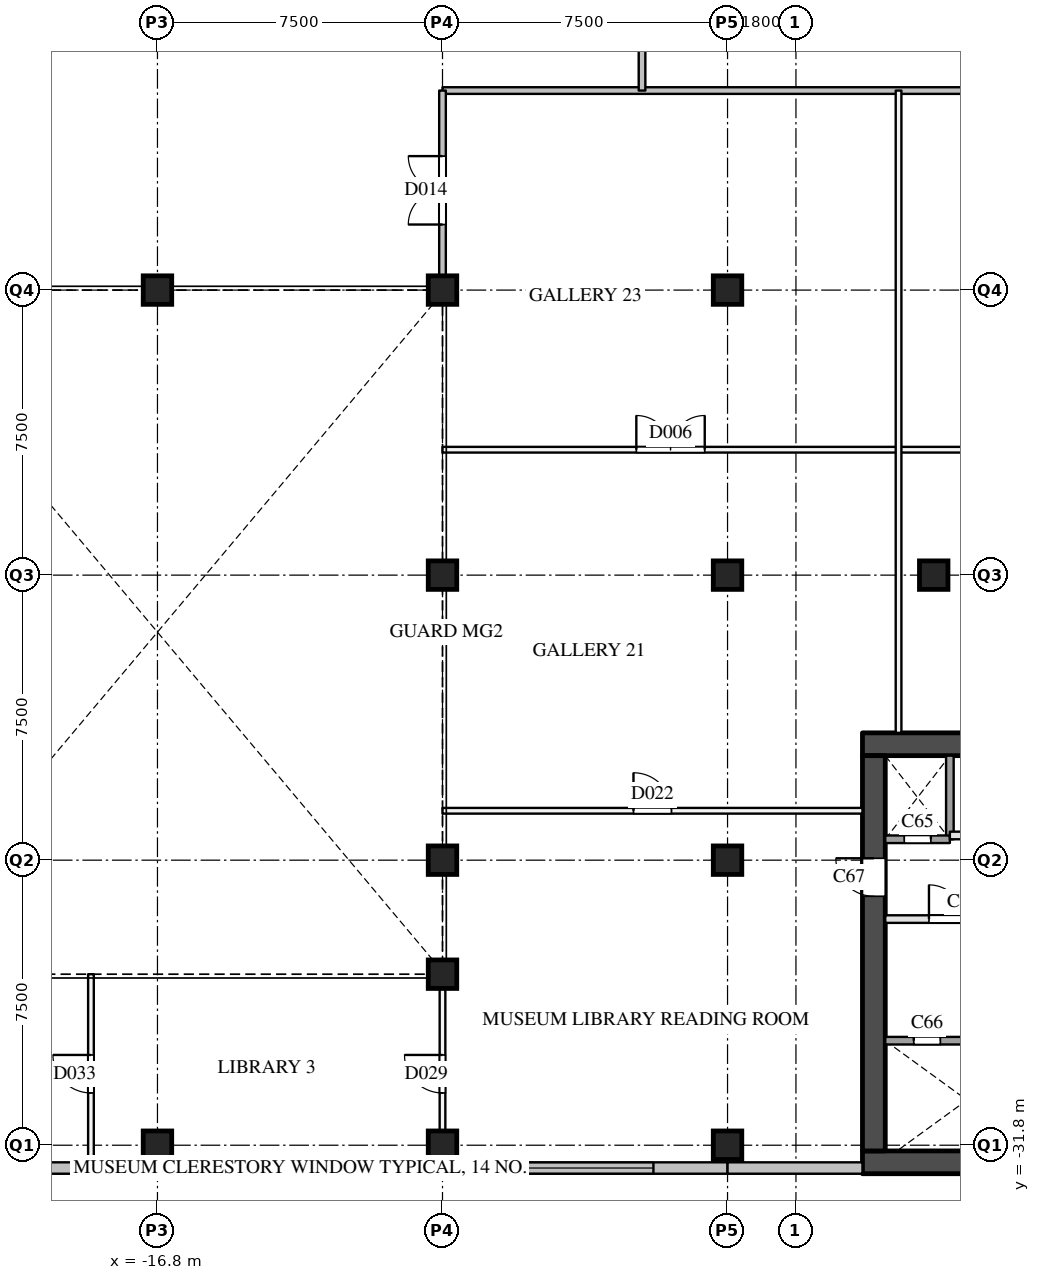
"""IFC4 building model, lengths in metres.
Left out: names, types, materials, properties, quantities, classifications, styles, units other than length and angle.
Written with IfcOpenShell. Run it as: python <this file> out.ifc"""

import sys

from ifc_helpers import new_model, si_unit, direction, frame, frame_2d, origin, origin_2d, place, context, subcontext, project, spatial, rectangle, extrude, element, fill, save


model = new_model("IFC4")
c1 = context("Model", 3, precision=1e-05, world=origin(), true_north=direction((0.0, 1.0)))
c2 = subcontext(c1, "Body", "Model", "MODEL_VIEW")
j1 = project(units=[si_unit("LENGTHUNIT", "METRE"), si_unit("PLANEANGLEUNIT", "RADIAN")], contexts=[c1])
p1 = place(None, origin())
s1 = spatial("IfcSite", under=j1, at=p1, CompositionType="ELEMENT")
p2 = place(p1, origin())
s2 = spatial("IfcBuilding", under=s1, at=p2, CompositionType="ELEMENT")
p3 = place(p2, frame((0.0, 0.0, 21.0)))
s3 = spatial("IfcBuildingStorey", under=s2, at=p3, CompositionType="ELEMENT", Elevation=21.0)
for number, where, z_axis, x_axis in (
    (1, (-16.8, -31.8, 0.0), (0.0, 0.0, 1.0), (1.0, 0.0, 0.0)),
    (2, (-16.8, -9.3, 0.0), (0.0, 0.0, 1.0), (1.0, 0.0, 0.0)),
    (3, (-9.3, -31.8, 0.0), (0.0, 0.0, 1.0), (1.0, 0.0, 0.0)),
    (4, (-9.3, -24.3, 0.0), (0.0, 0.0, 1.0), (1.0, 0.0, 0.0)),
    (5, (-9.3, -16.8, 0.0), (0.0, 0.0, 1.0), (1.0, 0.0, 0.0)),
    (6, (-9.3, -9.3, 0.0), (0.0, 0.0, 1.0), (1.0, 0.0, 0.0)),
    (7, (-1.8, -31.8, 0.0), (0.0, 0.0, 1.0), (1.0, 0.0, 0.0)),
    (8, (-1.8, -24.3, 0.0), (0.0, 0.0, 1.0), (1.0, 0.0, 0.0)),
    (9, (-1.8, -16.8, 0.0), (0.0, 0.0, 1.0), (1.0, 0.0, 0.0)),
    (10, (-1.8, -9.3, 0.0), (0.0, 0.0, 1.0), (1.0, 0.0, 0.0)),
    (11, (-9.3, -27.3, 0.0), (0.0, 0.0, 1.0), (1.0, 0.0, 0.0)),
    (12, (3.625, -16.8, 0.0), (0.0, 0.0, 1.0), (1.0, 0.0, 0.0)),
):
    element("IfcColumn", number, at=place(p3, frame(where, z_axis=z_axis, x_axis=x_axis)), inside=s3, PredefinedType="COLUMN", context=c2, shape_type="SweptSolid", body=[
        extrude(rectangle(XDim=0.75, YDim=0.75, at=origin_2d()), origin(), (0.0, 0.0, 1.0), 5.0),
    ])
p4 = place(p3, frame((-20.35, -32.4, 0.0), z_axis=(0.0, 0.0, 1.0), x_axis=(1.0, 0.0, 0.0)))
e13 = element("IfcWall", 13, at=p4, inside=s3, PredefinedType="SOLIDWALL", context=c2, shape_type="SweptSolid", body=[
    extrude(rectangle(XDim=3.55, YDim=0.3, at=frame_2d((1.775, 0.0))), origin(), (0.0, 0.0, 1.0), 4.59),
])
p5 = place(p3, frame((-16.8, -32.4, 0.0), z_axis=(0.0, 0.0, 1.0), x_axis=(1.0, 0.0, 0.0)))
e14 = element("IfcWall", 14, at=p5, inside=s3, PredefinedType="SOLIDWALL", context=c2, shape_type="SweptSolid", body=[
    extrude(rectangle(XDim=7.5, YDim=0.3, at=frame_2d((3.75, 0.0))), origin(), (0.0, 0.0, 1.0), 4.59),
])
p6 = place(p5, frame((1.95, 0.0, 2.4)))
e15 = element("IfcOpeningElement", 15, at=p6, cuts=e14, PredefinedType="OPENING", context=c2, shape_type="SweptSolid", body=[
    extrude(rectangle(XDim=3.6, YDim=1.2, at=frame_2d((1.8, 0.6))), frame((0.0, 0.16, 0.0), z_axis=(0.0, -1.0, 0.0), x_axis=(1.0, 0.0, 0.0)), (0.0, 0.0, 1.0), 0.32),
])
p7 = place(p3, frame((-9.3, -32.4, 0.0), z_axis=(0.0, 0.0, 1.0), x_axis=(1.0, 0.0, 0.0)))
e16 = element("IfcWall", 16, at=p7, inside=s3, PredefinedType="SOLIDWALL", context=c2, shape_type="SweptSolid", body=[
    extrude(rectangle(XDim=7.5, YDim=0.3, at=frame_2d((3.75, 0.0))), origin(), (0.0, 0.0, 1.0), 4.59),
])
p8 = place(p7, frame((1.95, 0.0, 2.4)))
e17 = element("IfcOpeningElement", 17, at=p8, cuts=e16, PredefinedType="OPENING", context=c2, shape_type="SweptSolid", body=[
    extrude(rectangle(XDim=3.6, YDim=1.2, at=frame_2d((1.8, 0.6))), frame((0.0, 0.16, 0.0), z_axis=(0.0, -1.0, 0.0), x_axis=(1.0, 0.0, 0.0)), (0.0, 0.0, 1.0), 0.32),
])
p9 = place(p3, frame((-1.8, -32.4, 0.0), z_axis=(0.0, 0.0, 1.0), x_axis=(1.0, 0.0, 0.0)))
e18 = element("IfcWall", 18, at=p9, inside=s3, PredefinedType="SOLIDWALL", context=c2, shape_type="SweptSolid", body=[
    extrude(rectangle(XDim=3.55, YDim=0.3, at=frame_2d((1.775, 0.0))), origin(), (0.0, 0.0, 1.0), 4.59),
])
for number, where, z_axis, x_axis in (
    (19, (1.75, -32.25, 0.0), (0.0, 0.0, 1.0), (1.0, 0.0, 0.0)),
    (20, (1.75, -21.25, 0.0), (0.0, 0.0, 1.0), (1.0, 0.0, 0.0)),
):
    element("IfcWall", number, at=place(p3, frame(where, z_axis=z_axis, x_axis=x_axis)), inside=s3, PredefinedType="SHEAR", context=c2, shape_type="SweptSolid", body=[
        extrude(rectangle(XDim=12.2, YDim=0.6, at=frame_2d((6.1, 0.0))), origin(), (0.0, 0.0, 1.0), 4.55),
    ])
p10 = place(p3, frame((2.05, -31.95, 0.0), z_axis=(0.0, 0.0, 1.0), x_axis=(0.0, 1.0, 0.0)))
e21 = element("IfcWall", 21, at=p10, inside=s3, PredefinedType="SHEAR", context=c2, shape_type="SweptSolid", body=[
    extrude(rectangle(XDim=10.4, YDim=0.6, at=frame_2d((5.2, 0.0))), origin(), (0.0, 0.0, 1.0), 4.55),
])
p11 = place(p10, frame((6.7, 0.0, 0.0)))
e22 = element("IfcOpeningElement", 22, at=p11, cuts=e21, PredefinedType="OPENING", context=c2, shape_type="SweptSolid", body=[
    extrude(rectangle(XDim=1.0, YDim=2.1, at=frame_2d((0.5, 1.05))), frame((0.0, 0.31, 0.0), z_axis=(0.0, -1.0, 0.0), x_axis=(1.0, 0.0, 0.0)), (0.0, 0.0, 1.0), 0.62),
])
p12 = place(p3, frame((4.05, -23.75, 0.0), z_axis=(0.0, 0.0, 1.0), x_axis=(0.0, 1.0, 0.0)))
e23 = element("IfcWall", 23, at=p12, inside=s3, PredefinedType="SOLIDWALL", context=c2, shape_type="SweptSolid", body=[
    extrude(rectangle(XDim=2.2, YDim=0.2, at=frame_2d((1.1, 0.0))), origin(), (0.0, 0.0, 1.0), 4.55),
])
p13 = place(p3, frame((2.35, -29.05, 0.0), z_axis=(0.0, 0.0, 1.0), x_axis=(1.0, 0.0, 0.0)))
e24 = element("IfcWall", 24, at=p13, inside=s3, PredefinedType="SOLIDWALL", context=c2, shape_type="SweptSolid", body=[
    extrude(rectangle(XDim=4.3, YDim=0.2, at=frame_2d((2.15, 0.0))), origin(), (0.0, 0.0, 1.0), 4.55),
])
p14 = place(p13, frame((2.65, 0.0, 0.0)))
e25 = element("IfcOpeningElement", 25, at=p14, cuts=e24, PredefinedType="OPENING", context=c2, shape_type="SweptSolid", body=[
    extrude(rectangle(XDim=1.2, YDim=2.1, at=frame_2d((0.6, 1.05))), frame((0.0, 0.11, 0.0), z_axis=(0.0, -1.0, 0.0), x_axis=(1.0, 0.0, 0.0)), (0.0, 0.0, 1.0), 0.22),
])
p15 = place(p13, frame((0.75, 0.0, 0.0)))
e26 = element("IfcOpeningElement", 26, at=p15, cuts=e24, PredefinedType="OPENING", context=c2, shape_type="SweptSolid", body=[
    extrude(rectangle(XDim=0.7, YDim=2.1, at=frame_2d((0.35, 1.05))), frame((0.0, 0.11, 0.0), z_axis=(0.0, -1.0, 0.0), x_axis=(1.0, 0.0, 0.0)), (0.0, 0.0, 1.0), 0.22),
])
p16 = place(p3, frame((2.35, -25.85, 0.0), z_axis=(0.0, 0.0, 1.0), x_axis=(1.0, 0.0, 0.0)))
e27 = element("IfcWall", 27, at=p16, inside=s3, PredefinedType="PARTITIONING", context=c2, shape_type="SweptSolid", body=[
    extrude(rectangle(XDim=4.3, YDim=0.2, at=frame_2d((2.15, 0.0))), origin(), (0.0, 0.0, 1.0), 4.55),
])
p17 = place(p16, frame((1.15, 0.0, 0.0)))
e28 = element("IfcOpeningElement", 28, at=p17, cuts=e27, PredefinedType="OPENING", context=c2, shape_type="SweptSolid", body=[
    extrude(rectangle(XDim=1.8, YDim=2.1, at=frame_2d((0.9, 1.05))), frame((0.0, 0.11, 0.0), z_axis=(0.0, -1.0, 0.0), x_axis=(1.0, 0.0, 0.0)), (0.0, 0.0, 1.0), 0.22),
])
p18 = place(p3, frame((4.05, -23.65, 0.0), z_axis=(0.0, 0.0, 1.0), x_axis=(1.0, 0.0, 0.0)))
e29 = element("IfcWall", 29, at=p18, inside=s3, PredefinedType="PARTITIONING", context=c2, shape_type="SweptSolid", body=[
    extrude(rectangle(XDim=9.3, YDim=0.2, at=frame_2d((4.65, 0.0))), origin(), (0.0, 0.0, 1.0), 4.55),
])
p19 = place(p18, frame((4.2, 0.0, 0.0)))
e30 = element("IfcOpeningElement", 30, at=p19, cuts=e29, PredefinedType="OPENING", context=c2, shape_type="SweptSolid", body=[
    extrude(rectangle(XDim=0.9, YDim=2.1, at=frame_2d((0.45, 1.05))), frame((0.0, 0.11, 0.0), z_axis=(0.0, -1.0, 0.0), x_axis=(1.0, 0.0, 0.0)), (0.0, 0.0, 1.0), 0.22),
])
p20 = place(p3, frame((2.35, -23.75, 0.0), z_axis=(0.0, 0.0, 1.0), x_axis=(1.0, 0.0, 0.0)))
e31 = element("IfcWall", 31, at=p20, inside=s3, PredefinedType="SOLIDWALL", context=c2, shape_type="SweptSolid", body=[
    extrude(rectangle(XDim=1.7, YDim=0.2, at=frame_2d((0.85, 0.0))), origin(), (0.0, 0.0, 1.0), 4.55),
])
p21 = place(p20, frame((0.5, 0.0, 0.0)))
e32 = element("IfcOpeningElement", 32, at=p21, cuts=e31, PredefinedType="OPENING", context=c2, shape_type="SweptSolid", body=[
    extrude(rectangle(XDim=0.7, YDim=2.1, at=frame_2d((0.35, 1.05))), frame((0.0, 0.11, 0.0), z_axis=(0.0, -1.0, 0.0), x_axis=(1.0, 0.0, 0.0)), (0.0, 0.0, 1.0), 0.22),
])
p22 = place(p3, frame((-9.3, -4.05, 0.0), z_axis=(0.0, 0.0, 1.0), x_axis=(1.0, 0.0, 0.0)))
e33 = element("IfcWall", 33, at=p22, inside=s3, PredefinedType="PARTITIONING", context=c2, shape_type="SweptSolid", body=[
    extrude(rectangle(XDim=23.25, YDim=0.175, at=frame_2d((11.625, 0.0))), origin(), (0.0, 0.0, 1.0), 3.79),
])
p23 = place(p22, frame((16.725, 0.0, 0.0)))
e34 = element("IfcOpeningElement", 34, at=p23, cuts=e33, PredefinedType="OPENING", context=c2, shape_type="SweptSolid", body=[
    extrude(rectangle(XDim=1.8, YDim=2.1, at=frame_2d((0.9, 1.05))), frame((0.0, 0.097, 0.0), z_axis=(0.0, -1.0, 0.0), x_axis=(1.0, 0.0, 0.0)), (0.0, 0.0, 1.0), 0.195),
])
p24 = place(p3, frame((-9.3, -9.3, 0.0), z_axis=(0.0, 0.0, 1.0), x_axis=(0.0, 1.0, 0.0)))
e35 = element("IfcWall", 35, at=p24, inside=s3, PredefinedType="PARTITIONING", context=c2, shape_type="SweptSolid", body=[
    extrude(rectangle(XDim=5.25, YDim=0.175, at=frame_2d((2.625, 0.0))), origin(), (0.0, 0.0, 1.0), 3.79),
])
p25 = place(p24, frame((1.725, 0.0, 0.0)))
e36 = element("IfcOpeningElement", 36, at=p25, cuts=e35, PredefinedType="OPENING", context=c2, shape_type="SweptSolid", body=[
    extrude(rectangle(XDim=1.8, YDim=2.1, at=frame_2d((0.9, 1.05))), frame((0.0, 0.097, 0.0), z_axis=(0.0, -1.0, 0.0), x_axis=(1.0, 0.0, 0.0)), (0.0, 0.0, 1.0), 0.195),
])
p26 = place(p3, frame((-4.05, -4.05, 0.0), z_axis=(0.0, 0.0, 1.0), x_axis=(0.0, 1.0, 0.0)))
e37 = element("IfcWall", 37, at=p26, inside=s3, PredefinedType="PARTITIONING", context=c2, shape_type="SweptSolid", body=[
    extrude(rectangle(XDim=63.0, YDim=0.175, at=frame_2d((31.5, 0.0))), origin(), (0.0, 0.0, 1.0), 3.79),
])
p27 = place(p26, frame((52.45, 0.0, 0.0)))
e38 = element("IfcOpeningElement", 38, at=p27, cuts=e37, PredefinedType="OPENING", context=c2, shape_type="SweptSolid", body=[
    extrude(rectangle(XDim=1.0, YDim=2.1, at=frame_2d((0.5, 1.05))), frame((0.0, 0.097, 0.0), z_axis=(0.0, -1.0, 0.0), x_axis=(1.0, 0.0, 0.0)), (0.0, 0.0, 1.0), 0.195),
])
p28 = place(p26, frame((7.525, 0.0, 0.0)))
e39 = element("IfcOpeningElement", 39, at=p28, cuts=e37, PredefinedType="OPENING", context=c2, shape_type="SweptSolid", body=[
    extrude(rectangle(XDim=1.0, YDim=2.1, at=frame_2d((0.5, 1.05))), frame((0.0, 0.097, 0.0), z_axis=(0.0, -1.0, 0.0), x_axis=(1.0, 0.0, 0.0)), (0.0, 0.0, 1.0), 0.195),
])
p29 = place(p26, frame((21.05, 0.0, 0.0)))
e40 = element("IfcOpeningElement", 40, at=p29, cuts=e37, PredefinedType="OPENING", context=c2, shape_type="SweptSolid", body=[
    extrude(rectangle(XDim=1.8, YDim=2.1, at=frame_2d((0.9, 1.05))), frame((0.0, 0.097, 0.0), z_axis=(0.0, -1.0, 0.0), x_axis=(1.0, 0.0, 0.0)), (0.0, 0.0, 1.0), 0.195),
])
p30 = place(p26, frame((32.85, 0.0, 0.0)))
e41 = element("IfcOpeningElement", 41, at=p30, cuts=e37, PredefinedType="OPENING", context=c2, shape_type="SweptSolid", body=[
    extrude(rectangle(XDim=1.8, YDim=2.1, at=frame_2d((0.9, 1.05))), frame((0.0, 0.097, 0.0), z_axis=(0.0, -1.0, 0.0), x_axis=(1.0, 0.0, 0.0)), (0.0, 0.0, 1.0), 0.195),
])
p31 = place(p26, frame((44.65, 0.0, 0.0)))
e42 = element("IfcOpeningElement", 42, at=p31, cuts=e37, PredefinedType="OPENING", context=c2, shape_type="SweptSolid", body=[
    extrude(rectangle(XDim=1.8, YDim=2.1, at=frame_2d((0.9, 1.05))), frame((0.0, 0.097, 0.0), z_axis=(0.0, -1.0, 0.0), x_axis=(1.0, 0.0, 0.0)), (0.0, 0.0, 1.0), 0.195),
])
p32 = place(p3, frame((-9.3, -13.5, 0.0), z_axis=(0.0, 0.0, 1.0), x_axis=(1.0, 0.0, 0.0)))
e43 = element("IfcWall", 43, at=p32, inside=s3, PredefinedType="PARTITIONING", context=c2, shape_type="SweptSolid", body=[
    extrude(rectangle(XDim=23.25, YDim=0.15, at=frame_2d((11.625, 0.0))), origin(), (0.0, 0.0, 1.0), 3.79),
])
p33 = place(p32, frame((5.1, 0.0, 0.0)))
e44 = element("IfcOpeningElement", 44, at=p33, cuts=e43, PredefinedType="OPENING", context=c2, shape_type="SweptSolid", body=[
    extrude(rectangle(XDim=1.8, YDim=2.1, at=frame_2d((0.9, 1.05))), frame((0.0, 0.085, 0.0), z_axis=(0.0, -1.0, 0.0), x_axis=(1.0, 0.0, 0.0)), (0.0, 0.0, 1.0), 0.17),
])
p34 = place(p32, frame((16.725, 0.0, 0.0)))
e45 = element("IfcOpeningElement", 45, at=p34, cuts=e43, PredefinedType="OPENING", context=c2, shape_type="SweptSolid", body=[
    extrude(rectangle(XDim=1.8, YDim=2.1, at=frame_2d((0.9, 1.05))), frame((0.0, 0.085, 0.0), z_axis=(0.0, -1.0, 0.0), x_axis=(1.0, 0.0, 0.0)), (0.0, 0.0, 1.0), 0.17),
])
p35 = place(p3, frame((2.7, -20.95, 0.0), z_axis=(0.0, 0.0, 1.0), x_axis=(0.0, 1.0, 0.0)))
e46 = element("IfcWall", 46, at=p35, inside=s3, PredefinedType="PARTITIONING", context=c2, shape_type="SweptSolid", body=[
    extrude(rectangle(XDim=16.9, YDim=0.15, at=frame_2d((8.45, 0.0))), origin(), (0.0, 0.0, 1.0), 3.79),
])
p36 = place(p3, frame((-9.3, -23.0, 0.0), z_axis=(0.0, 0.0, 1.0), x_axis=(1.0, 0.0, 0.0)))
e47 = element("IfcWall", 47, at=p36, inside=s3, PredefinedType="PARTITIONING", context=c2, shape_type="SweptSolid", body=[
    extrude(rectangle(XDim=11.05, YDim=0.15, at=frame_2d((5.525, 0.0))), origin(), (0.0, 0.0, 1.0), 3.79),
])
p37 = place(p36, frame((5.025, 0.0, 0.0)))
e48 = element("IfcOpeningElement", 48, at=p37, cuts=e47, PredefinedType="OPENING", context=c2, shape_type="SweptSolid", body=[
    extrude(rectangle(XDim=1.0, YDim=2.1, at=frame_2d((0.5, 1.05))), frame((0.0, 0.085, 0.0), z_axis=(0.0, -1.0, 0.0), x_axis=(1.0, 0.0, 0.0)), (0.0, 0.0, 1.0), 0.17),
])
p38 = place(p3, frame((-18.55, -32.55, 0.0), z_axis=(0.0, 0.0, 1.0), x_axis=(0.0, 1.0, 0.0)))
e49 = element("IfcWall", 49, at=p38, inside=s3, PredefinedType="PARTITIONING", context=c2, shape_type="SweptSolid", body=[
    extrude(rectangle(XDim=5.25, YDim=0.15, at=frame_2d((2.625, 0.0))), origin(), (0.0, 0.0, 1.0), 4.55),
])
p39 = place(p38, frame((2.125, 0.0, 0.0)))
e50 = element("IfcOpeningElement", 50, at=p39, cuts=e49, PredefinedType="OPENING", context=c2, shape_type="SweptSolid", body=[
    extrude(rectangle(XDim=1.0, YDim=2.1, at=frame_2d((0.5, 1.05))), frame((0.0, 0.085, 0.0), z_axis=(0.0, -1.0, 0.0), x_axis=(1.0, 0.0, 0.0)), (0.0, 0.0, 1.0), 0.17),
])
p40 = place(p3, frame((-9.3, -32.55, 0.0), z_axis=(0.0, 0.0, 1.0), x_axis=(0.0, 1.0, 0.0)))
e51 = element("IfcWall", 51, at=p40, inside=s3, PredefinedType="PARTITIONING", context=c2, shape_type="SweptSolid", body=[
    extrude(rectangle(XDim=5.25, YDim=0.15, at=frame_2d((2.625, 0.0))), origin(), (0.0, 0.0, 1.0), 3.79),
])
p41 = place(p40, frame((2.125, 0.0, 0.0)))
e52 = element("IfcOpeningElement", 52, at=p41, cuts=e51, PredefinedType="OPENING", context=c2, shape_type="SweptSolid", body=[
    extrude(rectangle(XDim=1.0, YDim=2.1, at=frame_2d((0.5, 1.05))), frame((0.0, 0.085, 0.0), z_axis=(0.0, -1.0, 0.0), x_axis=(1.0, 0.0, 0.0)), (0.0, 0.0, 1.0), 0.17),
])
p42 = place(p6, origin())
e53 = element("IfcWindow", 53, at=p42, inside=s3, PartitioningType="SINGLE_PANEL", PredefinedType="WINDOW", context=c2, shape_type="SweptSolid", body=[
    extrude(rectangle(XDim=3.6, YDim=1.2, at=frame_2d((1.8, 0.6))), frame((0.0, 0.03, 0.0), z_axis=(0.0, -1.0, 0.0), x_axis=(1.0, 0.0, 0.0)), (0.0, 0.0, 1.0), 0.06),
])
fill(e15, e53)
p43 = place(p8, origin())
e54 = element("IfcWindow", 54, at=p43, inside=s3, PartitioningType="SINGLE_PANEL", PredefinedType="WINDOW", context=c2, shape_type="SweptSolid", body=[
    extrude(rectangle(XDim=3.6, YDim=1.2, at=frame_2d((1.8, 0.6))), frame((0.0, 0.03, 0.0), z_axis=(0.0, -1.0, 0.0), x_axis=(1.0, 0.0, 0.0)), (0.0, 0.0, 1.0), 0.06),
])
fill(e17, e54)
p44 = place(p17, origin())
e55 = element("IfcDoor", 55, at=p44, inside=s3, OperationType="DOUBLE_DOOR_SINGLE_SWING", PredefinedType="DOOR", context=c2, shape_type="SweptSolid", body=[
    extrude(rectangle(XDim=1.8, YDim=2.1, at=frame_2d((0.9, 1.05))), frame((0.0, 0.025, 0.0), z_axis=(0.0, -1.0, 0.0), x_axis=(1.0, 0.0, 0.0)), (0.0, 0.0, 1.0), 0.05),
])
fill(e28, e55)
p45 = place(p21, origin())
e56 = element("IfcDoor", 56, at=p45, inside=s3, OperationType="SINGLE_SWING_RIGHT", PredefinedType="DOOR", context=c2, shape_type="SweptSolid", body=[
    extrude(rectangle(XDim=0.7, YDim=2.1, at=frame_2d((0.35, 1.05))), frame((0.0, 0.025, 0.0), z_axis=(0.0, -1.0, 0.0), x_axis=(1.0, 0.0, 0.0)), (0.0, 0.0, 1.0), 0.05),
])
fill(e32, e56)
p46 = place(p15, origin())
e57 = element("IfcDoor", 57, at=p46, inside=s3, OperationType="SINGLE_SWING_LEFT", PredefinedType="DOOR", context=c2, shape_type="SweptSolid", body=[
    extrude(rectangle(XDim=0.7, YDim=2.1, at=frame_2d((0.35, 1.05))), frame((0.0, 0.025, 0.0), z_axis=(0.0, -1.0, 0.0), x_axis=(1.0, 0.0, 0.0)), (0.0, 0.0, 1.0), 0.05),
])
fill(e26, e57)
p47 = place(p11, origin())
e58 = element("IfcDoor", 58, at=p47, inside=s3, OperationType="SINGLE_SWING_RIGHT", PredefinedType="DOOR", context=c2, shape_type="SweptSolid", body=[
    extrude(rectangle(XDim=1.0, YDim=2.1, at=frame_2d((0.5, 1.05))), frame((0.0, 0.025, 0.0), z_axis=(0.0, -1.0, 0.0), x_axis=(1.0, 0.0, 0.0)), (0.0, 0.0, 1.0), 0.05),
])
fill(e22, e58)
p48 = place(p33, origin())
e59 = element("IfcDoor", 59, at=p48, inside=s3, OperationType="DOUBLE_DOOR_SINGLE_SWING", PredefinedType="DOOR", context=c2, shape_type="SweptSolid", body=[
    extrude(rectangle(XDim=1.8, YDim=2.1, at=frame_2d((0.9, 1.05))), frame((0.0, 0.025, 0.0), z_axis=(0.0, -1.0, 0.0), x_axis=(1.0, 0.0, 0.0)), (0.0, 0.0, 1.0), 0.05),
])
fill(e44, e59)
p49 = place(p25, origin())
e60 = element("IfcDoor", 60, at=p49, inside=s3, OperationType="DOUBLE_DOOR_SINGLE_SWING", PredefinedType="DOOR", context=c2, shape_type="SweptSolid", body=[
    extrude(rectangle(XDim=1.8, YDim=2.1, at=frame_2d((0.9, 1.05))), frame((0.0, 0.025, 0.0), z_axis=(0.0, -1.0, 0.0), x_axis=(1.0, 0.0, 0.0)), (0.0, 0.0, 1.0), 0.05),
])
fill(e36, e60)
p50 = place(p37, origin())
e61 = element("IfcDoor", 61, at=p50, inside=s3, OperationType="SINGLE_SWING_LEFT", PredefinedType="DOOR", context=c2, shape_type="SweptSolid", body=[
    extrude(rectangle(XDim=1.0, YDim=2.1, at=frame_2d((0.5, 1.05))), frame((0.0, 0.025, 0.0), z_axis=(0.0, -1.0, 0.0), x_axis=(1.0, 0.0, 0.0)), (0.0, 0.0, 1.0), 0.05),
])
fill(e48, e61)
p51 = place(p41, origin())
e62 = element("IfcDoor", 62, at=p51, inside=s3, OperationType="SINGLE_SWING_RIGHT", PredefinedType="DOOR", context=c2, shape_type="SweptSolid", body=[
    extrude(rectangle(XDim=1.0, YDim=2.1, at=frame_2d((0.5, 1.05))), frame((0.0, 0.025, 0.0), z_axis=(0.0, -1.0, 0.0), x_axis=(1.0, 0.0, 0.0)), (0.0, 0.0, 1.0), 0.05),
])
fill(e52, e62)
p52 = place(p39, origin())
e63 = element("IfcDoor", 63, at=p52, inside=s3, OperationType="SINGLE_SWING_RIGHT", PredefinedType="DOOR", context=c2, shape_type="SweptSolid", body=[
    extrude(rectangle(XDim=1.0, YDim=2.1, at=frame_2d((0.5, 1.05))), frame((0.0, 0.025, 0.0), z_axis=(0.0, -1.0, 0.0), x_axis=(1.0, 0.0, 0.0)), (0.0, 0.0, 1.0), 0.05),
])
fill(e50, e63)
save(model, sys.argv[1])
